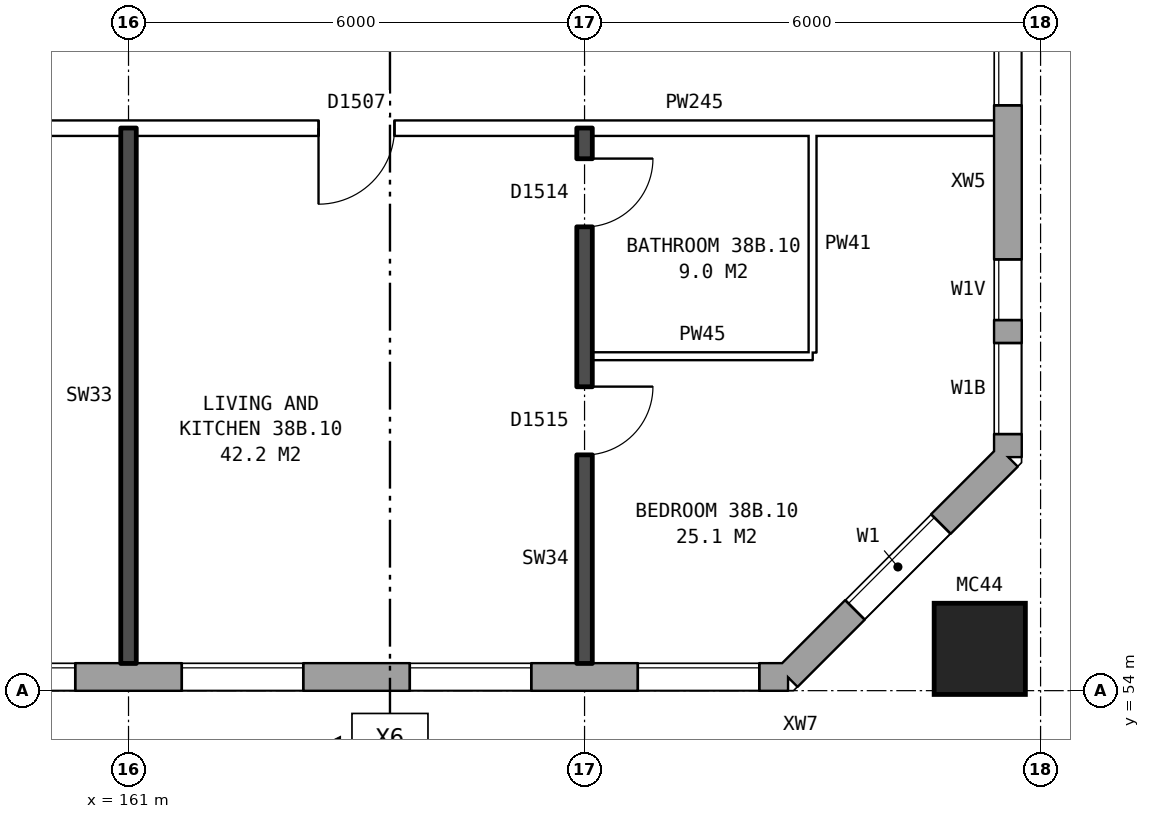
"""IFC4 building model, lengths in metres.
Left out: names, types, materials, properties, quantities, classifications, styles, units other than length and angle.
Written with IfcOpenShell. Run it as: python <this file> out.ifc"""

import sys

from ifc_helpers import new_model, si_unit, direction, frame, frame_2d, origin, origin_2d, place, context, subcontext, project, spatial, rectangle, hollow_rectangle, extrude, element, fill, save


model = new_model("IFC4")
c1 = context("Model", 3, precision=1e-05, world=origin(), true_north=direction((0.0, 1.0)))
c2 = subcontext(c1, "Body", "Model", "MODEL_VIEW")
j1 = project(units=[si_unit("LENGTHUNIT", "METRE"), si_unit("PLANEANGLEUNIT", "RADIAN")], contexts=[c1])
p1 = place(None, origin())
s1 = spatial("IfcSite", under=j1, at=p1, CompositionType="ELEMENT")
p2 = place(p1, origin())
s2 = spatial("IfcBuilding", under=s1, at=p2, CompositionType="ELEMENT")
p3 = place(p2, frame((0.0, 0.0, 136.1)))
s3 = spatial("IfcBuildingStorey", under=s2, at=p3, CompositionType="ELEMENT", Elevation=136.1)
p4 = place(p3, frame((172.2, 54.55, 0.0), z_axis=(0.0, 0.0, 1.0), x_axis=(1.0, 0.0, 0.0)))
e1 = element("IfcColumn", 1, at=p4, inside=s3, PredefinedType="COLUMN", context=c2, shape_type="SweptSolid", body=[
    extrude(hollow_rectangle(XDim=1.2, YDim=1.2, WallThickness=0.065, at=origin_2d()), origin(), (0.0, 0.0, 1.0), 3.1),
])
p5 = place(p3, frame((134.075, 54.18, 0.0), z_axis=(0.0, 0.0, 1.0), x_axis=(1.0, 0.0, 0.0)))
e2 = element("IfcWall", 2, at=p5, inside=s3, PredefinedType="STANDARD", context=c2, shape_type="SweptSolid", body=[
    extrude(rectangle(XDim=35.601, YDim=0.36, at=frame_2d((17.8, 0.0))), origin(), (0.0, 0.0, 1.0), 2.85),
])
p6 = place(p5, frame((0.625, 0.0, 0.8)))
e3 = element("IfcOpeningElement", 3, at=p6, cuts=e2, PredefinedType="OPENING", context=c2, shape_type="SweptSolid", body=[
    extrude(rectangle(XDim=1.6, YDim=1.8, at=frame_2d((0.8, 0.9))), frame((0.0, 0.19, 0.0), z_axis=(0.0, -1.0, 0.0), x_axis=(1.0, 0.0, 0.0)), (0.0, 0.0, 1.0), 0.38),
])
p7 = place(p5, frame((3.625, 0.0, 0.8)))
e4 = element("IfcOpeningElement", 4, at=p7, cuts=e2, PredefinedType="OPENING", context=c2, shape_type="SweptSolid", body=[
    extrude(rectangle(XDim=1.6, YDim=1.8, at=frame_2d((0.8, 0.9))), frame((0.0, 0.19, 0.0), z_axis=(0.0, -1.0, 0.0), x_axis=(1.0, 0.0, 0.0)), (0.0, 0.0, 1.0), 0.38),
])
p8 = place(p5, frame((6.625, 0.0, 0.8)))
e5 = element("IfcOpeningElement", 5, at=p8, cuts=e2, PredefinedType="OPENING", context=c2, shape_type="SweptSolid", body=[
    extrude(rectangle(XDim=1.6, YDim=1.8, at=frame_2d((0.8, 0.9))), frame((0.0, 0.19, 0.0), z_axis=(0.0, -1.0, 0.0), x_axis=(1.0, 0.0, 0.0)), (0.0, 0.0, 1.0), 0.38),
])
p9 = place(p5, frame((9.625, 0.0, 0.8)))
e6 = element("IfcOpeningElement", 6, at=p9, cuts=e2, PredefinedType="OPENING", context=c2, shape_type="SweptSolid", body=[
    extrude(rectangle(XDim=1.6, YDim=1.8, at=frame_2d((0.8, 0.9))), frame((0.0, 0.19, 0.0), z_axis=(0.0, -1.0, 0.0), x_axis=(1.0, 0.0, 0.0)), (0.0, 0.0, 1.0), 0.38),
])
p10 = place(p5, frame((12.075, 0.0, 1.05)))
e7 = element("IfcOpeningElement", 7, at=p10, cuts=e2, PredefinedType="OPENING", context=c2, shape_type="SweptSolid", body=[
    extrude(rectangle(XDim=0.8, YDim=1.5, at=frame_2d((0.4, 0.75))), frame((0.0, 0.19, 0.0), z_axis=(0.0, -1.0, 0.0), x_axis=(1.0, 0.0, 0.0)), (0.0, 0.0, 1.0), 0.38),
])
p11 = place(p5, frame((15.625, 0.0, 0.8)))
e8 = element("IfcOpeningElement", 8, at=p11, cuts=e2, PredefinedType="OPENING", context=c2, shape_type="SweptSolid", body=[
    extrude(rectangle(XDim=1.6, YDim=1.8, at=frame_2d((0.8, 0.9))), frame((0.0, 0.19, 0.0), z_axis=(0.0, -1.0, 0.0), x_axis=(1.0, 0.0, 0.0)), (0.0, 0.0, 1.0), 0.38),
])
p12 = place(p5, frame((18.625, 0.0, 0.8)))
e9 = element("IfcOpeningElement", 9, at=p12, cuts=e2, PredefinedType="OPENING", context=c2, shape_type="SweptSolid", body=[
    extrude(rectangle(XDim=1.6, YDim=1.8, at=frame_2d((0.8, 0.9))), frame((0.0, 0.19, 0.0), z_axis=(0.0, -1.0, 0.0), x_axis=(1.0, 0.0, 0.0)), (0.0, 0.0, 1.0), 0.38),
])
p13 = place(p5, frame((22.125, 0.0, 1.7)))
e10 = element("IfcOpeningElement", 10, at=p13, cuts=e2, PredefinedType="OPENING", context=c2, shape_type="SweptSolid", body=[
    extrude(rectangle(XDim=0.6, YDim=0.9, at=frame_2d((0.3, 0.45))), frame((0.0, 0.19, 0.0), z_axis=(0.0, -1.0, 0.0), x_axis=(1.0, 0.0, 0.0)), (0.0, 0.0, 1.0), 0.38),
])
p14 = place(p5, frame((24.625, 0.0, 0.8)))
e11 = element("IfcOpeningElement", 11, at=p14, cuts=e2, PredefinedType="OPENING", context=c2, shape_type="SweptSolid", body=[
    extrude(rectangle(XDim=1.6, YDim=1.8, at=frame_2d((0.8, 0.9))), frame((0.0, 0.19, 0.0), z_axis=(0.0, -1.0, 0.0), x_axis=(1.0, 0.0, 0.0)), (0.0, 0.0, 1.0), 0.38),
])
p15 = place(p5, frame((27.625, 0.0, 0.8)))
e12 = element("IfcOpeningElement", 12, at=p15, cuts=e2, PredefinedType="OPENING", context=c2, shape_type="SweptSolid", body=[
    extrude(rectangle(XDim=1.6, YDim=1.8, at=frame_2d((0.8, 0.9))), frame((0.0, 0.19, 0.0), z_axis=(0.0, -1.0, 0.0), x_axis=(1.0, 0.0, 0.0)), (0.0, 0.0, 1.0), 0.38),
])
p16 = place(p5, frame((30.625, 0.0, 0.8)))
e13 = element("IfcOpeningElement", 13, at=p16, cuts=e2, PredefinedType="OPENING", context=c2, shape_type="SweptSolid", body=[
    extrude(rectangle(XDim=1.6, YDim=1.8, at=frame_2d((0.8, 0.9))), frame((0.0, 0.19, 0.0), z_axis=(0.0, -1.0, 0.0), x_axis=(1.0, 0.0, 0.0)), (0.0, 0.0, 1.0), 0.38),
])
p17 = place(p5, frame((33.625, 0.0, 0.8)))
e14 = element("IfcOpeningElement", 14, at=p17, cuts=e2, PredefinedType="OPENING", context=c2, shape_type="SweptSolid", body=[
    extrude(rectangle(XDim=1.6, YDim=1.8, at=frame_2d((0.8, 0.9))), frame((0.0, 0.19, 0.0), z_axis=(0.0, -1.0, 0.0), x_axis=(1.0, 0.0, 0.0)), (0.0, 0.0, 1.0), 0.38),
])
p18 = place(p5, frame((13.975, 0.0, 0.15)))
e15 = element("IfcOpeningElement", 15, at=p18, cuts=e2, PredefinedType="OPENING", context=c2, shape_type="SweptSolid", body=[
    extrude(rectangle(XDim=0.6, YDim=0.9, at=frame_2d((0.3, 0.45))), frame((0.0, 0.19, 0.0), z_axis=(0.0, -1.0, 0.0), x_axis=(1.0, 0.0, 0.0)), (0.0, 0.0, 1.0), 0.38),
])
p19 = place(p5, frame((23.025, 0.0, 0.8)))
e16 = element("IfcOpeningElement", 16, at=p19, cuts=e2, PredefinedType="OPENING", context=c2, shape_type="SweptSolid", body=[
    extrude(rectangle(XDim=1.2, YDim=1.8, at=frame_2d((0.6, 0.9))), frame((0.0, 0.19, 0.0), z_axis=(0.0, -1.0, 0.0), x_axis=(1.0, 0.0, 0.0)), (0.0, 0.0, 1.0), 0.38),
])
p20 = place(p3, frame((169.675, 54.18, 0.0), z_axis=(0.0, 0.0, 1.0), x_axis=(0.707106781187, 0.707106781187, 0.0)))
e17 = element("IfcWall", 17, at=p20, inside=s3, PredefinedType="STANDARD", context=c2, shape_type="SweptSolid", body=[
    extrude(rectangle(XDim=4.094, YDim=0.36, at=frame_2d((2.047, 0.0))), origin(), (0.0, 0.0, 1.0), 2.85),
])
p21 = place(p20, frame((1.247, 0.0, 0.8)))
e18 = element("IfcOpeningElement", 18, at=p21, cuts=e17, PredefinedType="OPENING", context=c2, shape_type="SweptSolid", body=[
    extrude(rectangle(XDim=1.6, YDim=1.8, at=frame_2d((0.8, 0.9))), frame((0.0, 0.19, 0.0), z_axis=(0.0, -1.0, 0.0), x_axis=(1.0, 0.0, 0.0)), (0.0, 0.0, 1.0), 0.38),
])
p22 = place(p3, frame((172.57, 57.075, 0.0), z_axis=(0.0, 0.0, 1.0), x_axis=(0.0, 1.0, 0.0)))
e19 = element("IfcWall", 19, at=p22, inside=s3, PredefinedType="STANDARD", context=c2, shape_type="SweptSolid", body=[
    extrude(rectangle(XDim=25.851, YDim=0.36, at=frame_2d((12.925, 0.0))), origin(), (0.0, 0.0, 1.0), 2.85),
])
p23 = place(p22, frame((0.3, 0.0, 0.8)))
e20 = element("IfcOpeningElement", 20, at=p23, cuts=e19, PredefinedType="OPENING", context=c2, shape_type="SweptSolid", body=[
    extrude(rectangle(XDim=1.2, YDim=1.8, at=frame_2d((0.6, 0.9))), frame((0.0, 0.19, 0.0), z_axis=(0.0, -1.0, 0.0), x_axis=(1.0, 0.0, 0.0)), (0.0, 0.0, 1.0), 0.38),
])
p24 = place(p22, frame((4.625, 0.0, 0.8)))
e21 = element("IfcOpeningElement", 21, at=p24, cuts=e19, PredefinedType="OPENING", context=c2, shape_type="SweptSolid", body=[
    extrude(rectangle(XDim=1.6, YDim=1.8, at=frame_2d((0.8, 0.9))), frame((0.0, 0.19, 0.0), z_axis=(0.0, -1.0, 0.0), x_axis=(1.0, 0.0, 0.0)), (0.0, 0.0, 1.0), 0.38),
])
p25 = place(p22, frame((7.625, 0.0, 0.8)))
e22 = element("IfcOpeningElement", 22, at=p25, cuts=e19, PredefinedType="OPENING", context=c2, shape_type="SweptSolid", body=[
    extrude(rectangle(XDim=1.6, YDim=1.8, at=frame_2d((0.8, 0.9))), frame((0.0, 0.19, 0.0), z_axis=(0.0, -1.0, 0.0), x_axis=(1.0, 0.0, 0.0)), (0.0, 0.0, 1.0), 0.38),
])
p26 = place(p22, frame((10.625, 0.0, 0.8)))
e23 = element("IfcOpeningElement", 23, at=p26, cuts=e19, PredefinedType="OPENING", context=c2, shape_type="SweptSolid", body=[
    extrude(rectangle(XDim=1.6, YDim=1.8, at=frame_2d((0.8, 0.9))), frame((0.0, 0.19, 0.0), z_axis=(0.0, -1.0, 0.0), x_axis=(1.0, 0.0, 0.0)), (0.0, 0.0, 1.0), 0.38),
])
p27 = place(p22, frame((13.625, 0.0, 0.8)))
e24 = element("IfcOpeningElement", 24, at=p27, cuts=e19, PredefinedType="OPENING", context=c2, shape_type="SweptSolid", body=[
    extrude(rectangle(XDim=1.6, YDim=1.8, at=frame_2d((0.8, 0.9))), frame((0.0, 0.19, 0.0), z_axis=(0.0, -1.0, 0.0), x_axis=(1.0, 0.0, 0.0)), (0.0, 0.0, 1.0), 0.38),
])
p28 = place(p22, frame((16.625, 0.0, 0.8)))
e25 = element("IfcOpeningElement", 25, at=p28, cuts=e19, PredefinedType="OPENING", context=c2, shape_type="SweptSolid", body=[
    extrude(rectangle(XDim=1.6, YDim=1.8, at=frame_2d((0.8, 0.9))), frame((0.0, 0.19, 0.0), z_axis=(0.0, -1.0, 0.0), x_axis=(1.0, 0.0, 0.0)), (0.0, 0.0, 1.0), 0.38),
])
p29 = place(p22, frame((19.625, 0.0, 0.8)))
e26 = element("IfcOpeningElement", 26, at=p29, cuts=e19, PredefinedType="OPENING", context=c2, shape_type="SweptSolid", body=[
    extrude(rectangle(XDim=1.6, YDim=1.8, at=frame_2d((0.8, 0.9))), frame((0.0, 0.19, 0.0), z_axis=(0.0, -1.0, 0.0), x_axis=(1.0, 0.0, 0.0)), (0.0, 0.0, 1.0), 0.38),
])
p30 = place(p22, frame((23.125, 0.0, 0.8)))
e27 = element("IfcOpeningElement", 27, at=p30, cuts=e19, PredefinedType="OPENING", context=c2, shape_type="SweptSolid", body=[
    extrude(rectangle(XDim=1.0, YDim=0.9, at=frame_2d((0.5, 0.45))), frame((0.0, 0.19, 0.0), z_axis=(0.0, -1.0, 0.0), x_axis=(1.0, 0.0, 0.0)), (0.0, 0.0, 1.0), 0.38),
])
p31 = place(p22, frame((1.8, 0.0, 0.8)))
e28 = element("IfcOpeningElement", 28, at=p31, cuts=e19, PredefinedType="OPENING", context=c2, shape_type="SweptSolid", body=[
    extrude(rectangle(XDim=0.8, YDim=0.9, at=frame_2d((0.4, 0.45))), frame((0.0, 0.19, 0.0), z_axis=(0.0, -1.0, 0.0), x_axis=(1.0, 0.0, 0.0)), (0.0, 0.0, 1.0), 0.38),
])
p32 = place(p22, frame((24.425, 0.0, 0.8)))
e29 = element("IfcOpeningElement", 29, at=p32, cuts=e19, PredefinedType="OPENING", context=c2, shape_type="SweptSolid", body=[
    extrude(rectangle(XDim=1.0, YDim=1.8, at=frame_2d((0.5, 0.9))), frame((0.0, 0.19, 0.0), z_axis=(0.0, -1.0, 0.0), x_axis=(1.0, 0.0, 0.0)), (0.0, 0.0, 1.0), 0.38),
])
p33 = place(p3, frame((167.1, 58.4, 0.0), z_axis=(0.0, 0.0, 1.0), x_axis=(1.0, 0.0, 0.0)))
e30 = element("IfcWall", 30, at=p33, inside=s3, PredefinedType="PARTITIONING", context=c2, shape_type="SweptSolid", body=[
    extrude(rectangle(XDim=2.9, YDim=0.1, at=frame_2d((1.45, 0.0))), origin(), (0.0, 0.0, 1.0), 2.85),
])
p34 = place(p3, frame((155.1, 61.4, 0.0), z_axis=(0.0, 0.0, 1.0), x_axis=(1.0, 0.0, 0.0)))
e31 = element("IfcWall", 31, at=p34, inside=s3, PredefinedType="PARTITIONING", context=c2, shape_type="SweptSolid", body=[
    extrude(rectangle(XDim=17.29, YDim=0.2, at=frame_2d((8.645, 0.0))), origin(), (0.0, 0.0, 1.0), 2.85),
])
p35 = place(p34, frame((3.6, 0.0, 0.0)))
e32 = element("IfcOpeningElement", 32, at=p35, cuts=e31, PredefinedType="OPENING", context=c2, shape_type="SweptSolid", body=[
    extrude(rectangle(XDim=1.0, YDim=2.1, at=frame_2d((0.5, 1.05))), frame((0.0, 0.11, 0.0), z_axis=(0.0, -1.0, 0.0), x_axis=(1.0, 0.0, 0.0)), (0.0, 0.0, 1.0), 0.22),
])
p36 = place(p34, frame((8.4, 0.0, 0.0)))
e33 = element("IfcOpeningElement", 33, at=p36, cuts=e31, PredefinedType="OPENING", context=c2, shape_type="SweptSolid", body=[
    extrude(rectangle(XDim=1.0, YDim=2.1, at=frame_2d((0.5, 1.05))), frame((0.0, 0.11, 0.0), z_axis=(0.0, -1.0, 0.0), x_axis=(1.0, 0.0, 0.0)), (0.0, 0.0, 1.0), 0.22),
])
p37 = place(p3, frame((161.0, 54.36, 0.0), z_axis=(0.0, 0.0, 1.0), x_axis=(0.0, 1.0, 0.0)))
e34 = element("IfcWall", 34, at=p37, inside=s3, PredefinedType="SOLIDWALL", context=c2, shape_type="SweptSolid", body=[
    extrude(rectangle(XDim=7.04, YDim=0.2, at=frame_2d((3.52, 0.0))), origin(), (0.0, 0.0, 1.0), 2.85),
])
p38 = place(p3, frame((167.0, 54.36, 0.0), z_axis=(0.0, 0.0, 1.0), x_axis=(0.0, 1.0, 0.0)))
e35 = element("IfcWall", 35, at=p38, inside=s3, PredefinedType="SOLIDWALL", context=c2, shape_type="SweptSolid", body=[
    extrude(rectangle(XDim=7.04, YDim=0.2, at=frame_2d((3.52, 0.0))), origin(), (0.0, 0.0, 1.0), 2.85),
])
p39 = place(p38, frame((2.74, 0.0, 0.0)))
e36 = element("IfcOpeningElement", 36, at=p39, cuts=e35, PredefinedType="OPENING", context=c2, shape_type="SweptSolid", body=[
    extrude(rectangle(XDim=0.9, YDim=2.1, at=frame_2d((0.45, 1.05))), frame((0.0, 0.11, 0.0), z_axis=(0.0, -1.0, 0.0), x_axis=(1.0, 0.0, 0.0)), (0.0, 0.0, 1.0), 0.22),
])
p40 = place(p38, frame((5.74, 0.0, 0.0)))
e37 = element("IfcOpeningElement", 37, at=p40, cuts=e35, PredefinedType="OPENING", context=c2, shape_type="SweptSolid", body=[
    extrude(rectangle(XDim=0.9, YDim=2.1, at=frame_2d((0.45, 1.05))), frame((0.0, 0.11, 0.0), z_axis=(0.0, -1.0, 0.0), x_axis=(1.0, 0.0, 0.0)), (0.0, 0.0, 1.0), 0.22),
])
p41 = place(p3, frame((170.0, 58.45, 0.0), z_axis=(0.0, 0.0, 1.0), x_axis=(0.0, 1.0, 0.0)))
e38 = element("IfcWall", 38, at=p41, inside=s3, PredefinedType="PARTITIONING", context=c2, shape_type="SweptSolid", body=[
    extrude(rectangle(XDim=2.85, YDim=0.1, at=frame_2d((1.425, 0.0))), origin(), (0.0, 0.0, 1.0), 2.85),
])
p42 = place(p14, origin())
e39 = element("IfcWindow", 39, at=p42, inside=s3, PartitioningType="SINGLE_PANEL", PredefinedType="WINDOW", context=c2, shape_type="SweptSolid", body=[
    extrude(rectangle(XDim=1.6, YDim=1.8, at=frame_2d((0.8, 0.9))), frame((0.0, 0.15, 0.0), z_axis=(0.0, -1.0, 0.0), x_axis=(1.0, 0.0, 0.0)), (0.0, 0.0, 1.0), 0.06),
])
fill(e11, e39)
p43 = place(p15, origin())
e40 = element("IfcWindow", 40, at=p43, inside=s3, PartitioningType="SINGLE_PANEL", PredefinedType="WINDOW", context=c2, shape_type="SweptSolid", body=[
    extrude(rectangle(XDim=1.6, YDim=1.8, at=frame_2d((0.8, 0.9))), frame((0.0, 0.15, 0.0), z_axis=(0.0, -1.0, 0.0), x_axis=(1.0, 0.0, 0.0)), (0.0, 0.0, 1.0), 0.06),
])
fill(e12, e40)
p44 = place(p16, origin())
e41 = element("IfcWindow", 41, at=p44, inside=s3, PartitioningType="SINGLE_PANEL", PredefinedType="WINDOW", context=c2, shape_type="SweptSolid", body=[
    extrude(rectangle(XDim=1.6, YDim=1.8, at=frame_2d((0.8, 0.9))), frame((0.0, 0.15, 0.0), z_axis=(0.0, -1.0, 0.0), x_axis=(1.0, 0.0, 0.0)), (0.0, 0.0, 1.0), 0.06),
])
fill(e13, e41)
p45 = place(p17, origin())
e42 = element("IfcWindow", 42, at=p45, inside=s3, PartitioningType="SINGLE_PANEL", PredefinedType="WINDOW", context=c2, shape_type="SweptSolid", body=[
    extrude(rectangle(XDim=1.6, YDim=1.8, at=frame_2d((0.8, 0.9))), frame((0.0, 0.15, 0.0), z_axis=(0.0, -1.0, 0.0), x_axis=(1.0, 0.0, 0.0)), (0.0, 0.0, 1.0), 0.06),
])
fill(e14, e42)
p46 = place(p21, origin())
e43 = element("IfcWindow", 43, at=p46, inside=s3, PartitioningType="SINGLE_PANEL", PredefinedType="WINDOW", context=c2, shape_type="SweptSolid", body=[
    extrude(rectangle(XDim=1.6, YDim=1.8, at=frame_2d((0.8, 0.9))), frame((0.0, 0.15, 0.0), z_axis=(0.0, -1.0, 0.0), x_axis=(1.0, 0.0, 0.0)), (0.0, 0.0, 1.0), 0.06),
])
fill(e18, e43)
p47 = place(p23, origin())
e44 = element("IfcWindow", 44, at=p47, inside=s3, PartitioningType="SINGLE_PANEL", PredefinedType="WINDOW", context=c2, shape_type="SweptSolid", body=[
    extrude(rectangle(XDim=1.2, YDim=1.8, at=frame_2d((0.6, 0.9))), frame((0.0, 0.15, 0.0), z_axis=(0.0, -1.0, 0.0), x_axis=(1.0, 0.0, 0.0)), (0.0, 0.0, 1.0), 0.06),
])
fill(e20, e44)
p48 = place(p24, origin())
e45 = element("IfcWindow", 45, at=p48, inside=s3, PartitioningType="SINGLE_PANEL", PredefinedType="WINDOW", context=c2, shape_type="SweptSolid", body=[
    extrude(rectangle(XDim=1.6, YDim=1.8, at=frame_2d((0.8, 0.9))), frame((0.0, 0.15, 0.0), z_axis=(0.0, -1.0, 0.0), x_axis=(1.0, 0.0, 0.0)), (0.0, 0.0, 1.0), 0.06),
])
fill(e21, e45)
p49 = place(p39, frame((0.9, 0.0, 0.0), z_axis=(0.0, 0.0, 1.0), x_axis=(-1.0, 0.0, 0.0)))
e46 = element("IfcDoor", 46, at=p49, inside=s3, OperationType="SINGLE_SWING_LEFT", PredefinedType="DOOR", context=c2, shape_type="SweptSolid", body=[
    extrude(rectangle(XDim=0.9, YDim=2.1, at=frame_2d((0.45, 1.05))), frame((0.0, 0.025, 0.0), z_axis=(0.0, -1.0, 0.0), x_axis=(1.0, 0.0, 0.0)), (0.0, 0.0, 1.0), 0.05),
])
fill(e36, e46)
p50 = place(p36, frame((1.0, 0.0, 0.0), z_axis=(0.0, 0.0, 1.0), x_axis=(-1.0, 0.0, 0.0)))
e47 = element("IfcDoor", 47, at=p50, inside=s3, OperationType="SINGLE_SWING_RIGHT", PredefinedType="DOOR", context=c2, shape_type="SweptSolid", body=[
    extrude(rectangle(XDim=1.0, YDim=2.1, at=frame_2d((0.5, 1.05))), frame((0.0, 0.025, 0.0), z_axis=(0.0, -1.0, 0.0), x_axis=(1.0, 0.0, 0.0)), (0.0, 0.0, 1.0), 0.05),
])
fill(e33, e47)
p51 = place(p40, frame((0.9, 0.0, 0.0), z_axis=(0.0, 0.0, 1.0), x_axis=(-1.0, 0.0, 0.0)))
e48 = element("IfcDoor", 48, at=p51, inside=s3, OperationType="SINGLE_SWING_LEFT", PredefinedType="DOOR", context=c2, shape_type="SweptSolid", body=[
    extrude(rectangle(XDim=0.9, YDim=2.1, at=frame_2d((0.45, 1.05))), frame((0.0, 0.025, 0.0), z_axis=(0.0, -1.0, 0.0), x_axis=(1.0, 0.0, 0.0)), (0.0, 0.0, 1.0), 0.05),
])
fill(e37, e48)
p52 = place(p31, origin())
e49 = element("IfcWindow", 49, at=p52, inside=s3, PartitioningType="SINGLE_PANEL", PredefinedType="WINDOW", context=c2, shape_type="SweptSolid", body=[
    extrude(rectangle(XDim=0.8, YDim=0.9, at=frame_2d((0.4, 0.45))), frame((0.0, 0.15, 0.0), z_axis=(0.0, -1.0, 0.0), x_axis=(1.0, 0.0, 0.0)), (0.0, 0.0, 1.0), 0.06),
])
fill(e28, e49)
save(model, sys.argv[1])
